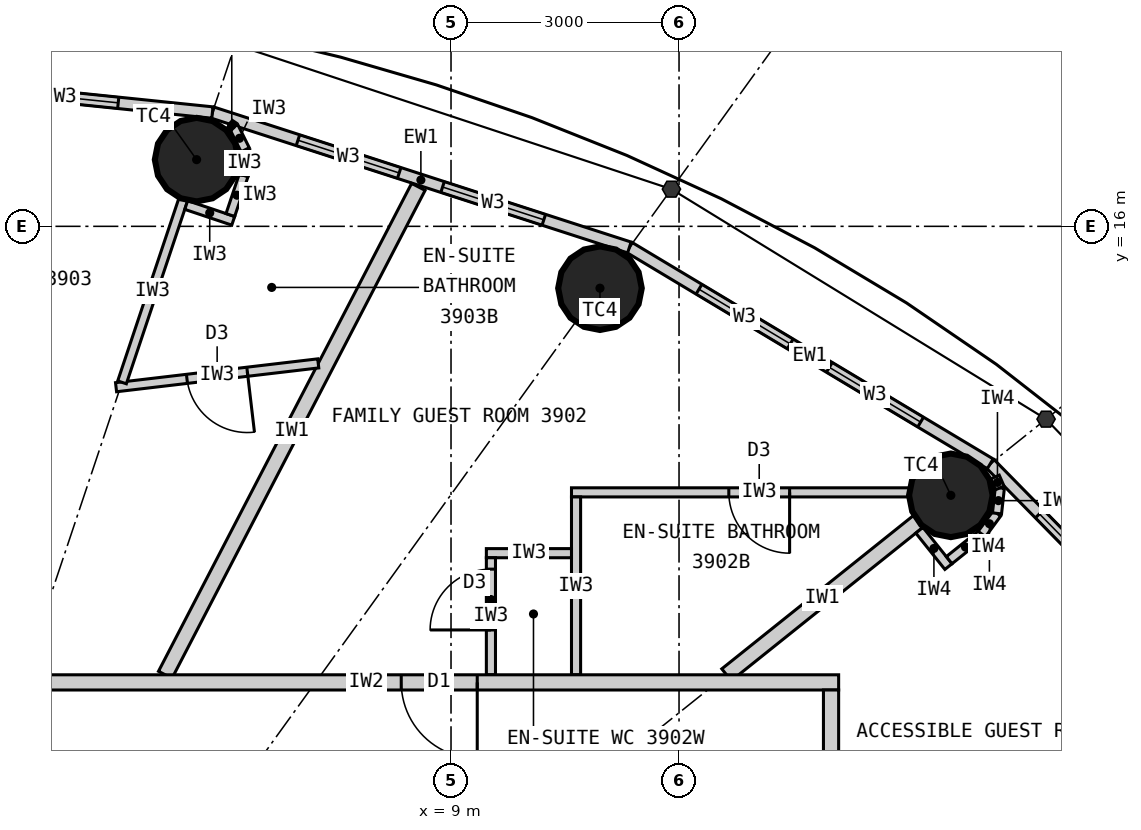
"""IFC4 building model, lengths in metres.
Left out: names, types, materials, properties, quantities, classifications, styles, units other than length and angle.
Written with IfcOpenShell. Run it as: python <this file> out.ifc"""

import sys

from ifc_helpers import new_model, si_unit, direction, frame, frame_2d, origin, origin_2d, place, context, subcontext, project, spatial, rectangle, circle, extrude, element, fill, save


model = new_model("IFC4")
c1 = context("Model", 3, precision=1e-05, world=origin(), true_north=direction((0.0, 1.0)))
c2 = subcontext(c1, "Body", "Model", "MODEL_VIEW")
j1 = project(units=[si_unit("LENGTHUNIT", "METRE"), si_unit("PLANEANGLEUNIT", "RADIAN")], contexts=[c1])
p1 = place(None, origin())
s1 = spatial("IfcSite", under=j1, at=p1, CompositionType="ELEMENT")
p2 = place(p1, origin())
s2 = spatial("IfcBuilding", under=s1, at=p2, CompositionType="ELEMENT")
p3 = place(p2, frame((0.0, 0.0, 150.0)))
s3 = spatial("IfcBuildingStorey", under=s2, at=p3, CompositionType="ELEMENT", Elevation=150.0)
for number, where, z_axis, x_axis in (
    (1, (15.576, 12.461, 0.0), (0.0, 0.0, 1.0), (1.0, 0.0, 0.0)),
    (2, (10.96, 15.186, 0.0), (0.0, 0.0, 1.0), (1.0, 0.0, 0.0)),
    (3, (5.653, 16.877, 0.0), (0.0, 0.0, 1.0), (1.0, 0.0, 0.0)),
):
    element("IfcColumn", number, at=place(p3, frame(where, z_axis=z_axis, x_axis=x_axis)), inside=s3, PredefinedType="COLUMN", context=c2, shape_type="SweptSolid", body=[
        extrude(circle(Radius=0.55, at=origin_2d()), origin(), (0.0, 0.0, 1.0), 3.3),
    ])
p4 = place(p3, frame((19.772, 9.132, 0.0), z_axis=(0.0, 0.0, 1.0), x_axis=(-0.700727467776, 0.71342905457, 0.0)))
e4 = element("IfcWall", 4, at=p4, inside=s3, PredefinedType="ELEMENTEDWALL", context=c2, shape_type="SweptSolid", body=[
    extrude(rectangle(XDim=5.247, YDim=0.15, at=frame_2d((2.624, 0.0))), origin(), (0.0, 0.0, 1.0), 3.12),
])
p5 = place(p4, frame((0.924, 0.0, 0.9)))
e5 = element("IfcOpeningElement", 5, at=p5, cuts=e4, PredefinedType="OPENING", context=c2, shape_type="SweptSolid", body=[
    extrude(rectangle(XDim=1.4, YDim=1.9, at=frame_2d((0.7, 0.95))), frame((0.0, 0.085, 0.0), z_axis=(0.0, -1.0, 0.0), x_axis=(1.0, 0.0, 0.0)), (0.0, 0.0, 1.0), 0.17),
])
p6 = place(p4, frame((2.924, 0.0, 0.9)))
e6 = element("IfcOpeningElement", 6, at=p6, cuts=e4, PredefinedType="OPENING", context=c2, shape_type="SweptSolid", body=[
    extrude(rectangle(XDim=1.4, YDim=1.9, at=frame_2d((0.7, 0.95))), frame((0.0, 0.085, 0.0), z_axis=(0.0, -1.0, 0.0), x_axis=(1.0, 0.0, 0.0)), (0.0, 0.0, 1.0), 0.17),
])
p7 = place(p3, frame((16.095, 12.876, 0.0), z_axis=(0.0, 0.0, 1.0), x_axis=(-0.857695199231, 0.514158482587, 0.0)))
e7 = element("IfcWall", 7, at=p7, inside=s3, PredefinedType="ELEMENTEDWALL", context=c2, shape_type="SweptSolid", body=[
    extrude(rectangle(XDim=5.536, YDim=0.15, at=frame_2d((2.768, 0.0))), origin(), (0.0, 0.0, 1.0), 3.12),
])
p8 = place(p7, frame((1.068, 0.0, 0.9)))
e8 = element("IfcOpeningElement", 8, at=p8, cuts=e7, PredefinedType="OPENING", context=c2, shape_type="SweptSolid", body=[
    extrude(rectangle(XDim=1.4, YDim=1.9, at=frame_2d((0.7, 0.95))), frame((0.0, 0.085, 0.0), z_axis=(0.0, -1.0, 0.0), x_axis=(1.0, 0.0, 0.0)), (0.0, 0.0, 1.0), 0.17),
])
p9 = place(p7, frame((3.068, 0.0, 0.9)))
e9 = element("IfcOpeningElement", 9, at=p9, cuts=e7, PredefinedType="OPENING", context=c2, shape_type="SweptSolid", body=[
    extrude(rectangle(XDim=1.4, YDim=1.9, at=frame_2d((0.7, 0.95))), frame((0.0, 0.085, 0.0), z_axis=(0.0, -1.0, 0.0), x_axis=(1.0, 0.0, 0.0)), (0.0, 0.0, 1.0), 0.17),
])
p10 = place(p3, frame((11.346, 15.722, 0.0), z_axis=(0.0, 0.0, 1.0), x_axis=(-0.951432482129, 0.307857486429, 0.0)))
e10 = element("IfcWall", 10, at=p10, inside=s3, PredefinedType="ELEMENTEDWALL", context=c2, shape_type="SweptSolid", body=[
    extrude(rectangle(XDim=5.766, YDim=0.15, at=frame_2d((2.883, 0.0))), origin(), (0.0, 0.0, 1.0), 3.12),
])
p11 = place(p10, frame((1.183, 0.0, 0.9)))
e11 = element("IfcOpeningElement", 11, at=p11, cuts=e10, PredefinedType="OPENING", context=c2, shape_type="SweptSolid", body=[
    extrude(rectangle(XDim=1.4, YDim=1.9, at=frame_2d((0.7, 0.95))), frame((0.0, 0.085, 0.0), z_axis=(0.0, -1.0, 0.0), x_axis=(1.0, 0.0, 0.0)), (0.0, 0.0, 1.0), 0.17),
])
p12 = place(p10, frame((3.183, 0.0, 0.9)))
e12 = element("IfcOpeningElement", 12, at=p12, cuts=e10, PredefinedType="OPENING", context=c2, shape_type="SweptSolid", body=[
    extrude(rectangle(XDim=1.4, YDim=1.9, at=frame_2d((0.7, 0.95))), frame((0.0, 0.085, 0.0), z_axis=(0.0, -1.0, 0.0), x_axis=(1.0, 0.0, 0.0)), (0.0, 0.0, 1.0), 0.17),
])
p13 = place(p3, frame((5.86, 17.497, 0.0), z_axis=(0.0, 0.0, 1.0), x_axis=(-0.994751738032, 0.102318032045, 0.0)))
e13 = element("IfcWall", 13, at=p13, inside=s3, PredefinedType="ELEMENTEDWALL", context=c2, shape_type="SweptSolid", body=[
    extrude(rectangle(XDim=5.891, YDim=0.15, at=frame_2d((2.946, 0.0))), origin(), (0.0, 0.0, 1.0), 3.12),
])
p14 = place(p13, frame((1.246, 0.0, 0.9)))
e14 = element("IfcOpeningElement", 14, at=p14, cuts=e13, PredefinedType="OPENING", context=c2, shape_type="SweptSolid", body=[
    extrude(rectangle(XDim=1.4, YDim=1.9, at=frame_2d((0.7, 0.95))), frame((0.0, 0.085, 0.0), z_axis=(0.0, -1.0, 0.0), x_axis=(1.0, 0.0, 0.0)), (0.0, 0.0, 1.0), 0.17),
])
p15 = place(p13, frame((3.246, 0.0, 0.9)))
e15 = element("IfcOpeningElement", 15, at=p15, cuts=e13, PredefinedType="OPENING", context=c2, shape_type="SweptSolid", body=[
    extrude(rectangle(XDim=1.4, YDim=1.9, at=frame_2d((0.7, 0.95))), frame((0.0, 0.085, 0.0), z_axis=(0.0, -1.0, 0.0), x_axis=(1.0, 0.0, 0.0)), (0.0, 0.0, 1.0), 0.17),
])
p16 = place(p3, frame((12.625, 10.1, 0.0), z_axis=(0.0, 0.0, 1.0), x_axis=(0.780876185034, 0.624685827954, 0.0)))
e16 = element("IfcWall", 16, at=p16, inside=s3, PredefinedType="PARTITIONING", context=c2, shape_type="SweptSolid", body=[
    extrude(rectangle(XDim=3.229, YDim=0.2, at=frame_2d((1.615, 0.0))), origin(), (0.0, 0.0, 1.0), 2.42),
])
p17 = place(p3, frame((5.24, 10.1, 0.0), z_axis=(0.0, 0.0, 1.0), x_axis=(0.460532965373, 0.887642601391, 0.0)))
e17 = element("IfcWall", 17, at=p17, inside=s3, PredefinedType="PARTITIONING", context=c2, shape_type="SweptSolid", body=[
    extrude(rectangle(XDim=7.231, YDim=0.2, at=frame_2d((3.616, 0.0))), origin(), (0.0, 0.0, 1.0), 3.12),
])
p18 = place(p3, frame((15.525, 12.5, 0.0), z_axis=(0.0, 0.0, 1.0), x_axis=(-1.0, 0.0, 0.0)))
e18 = element("IfcWall", 18, at=p18, inside=s3, PredefinedType="PARTITIONING", context=c2, shape_type="SweptSolid", body=[
    extrude(rectangle(XDim=4.94, YDim=0.12, at=frame_2d((2.47, 0.0))), origin(), (0.0, 0.0, 1.0), 3.12),
])
p19 = place(p18, frame((2.07, 0.0, 0.0)))
e19 = element("IfcOpeningElement", 19, at=p19, cuts=e18, PredefinedType="OPENING", context=c2, shape_type="SweptSolid", body=[
    extrude(rectangle(XDim=0.8, YDim=2.1, at=frame_2d((0.4, 1.05))), frame((0.0, 0.07, 0.0), z_axis=(0.0, -1.0, 0.0), x_axis=(1.0, 0.0, 0.0)), (0.0, 0.0, 1.0), 0.14),
])
p20 = place(p3, frame((10.645, 10.1, 0.0), z_axis=(0.0, 0.0, 1.0), x_axis=(0.0, 1.0, 0.0)))
e20 = element("IfcWall", 20, at=p20, inside=s3, PredefinedType="PARTITIONING", context=c2, shape_type="SweptSolid", body=[
    extrude(rectangle(XDim=2.34, YDim=0.12, at=frame_2d((1.17, 0.0))), origin(), (0.0, 0.0, 1.0), 3.12),
])
p21 = place(p3, frame((10.585, 11.7, 0.0), z_axis=(0.0, 0.0, 1.0), x_axis=(-1.0, 0.0, 0.0)))
e21 = element("IfcWall", 21, at=p21, inside=s3, PredefinedType="PARTITIONING", context=c2, shape_type="SweptSolid", body=[
    extrude(rectangle(XDim=1.12, YDim=0.12, at=frame_2d((0.56, 0.0))), origin(), (0.0, 0.0, 1.0), 3.12),
])
p22 = place(p3, frame((9.525, 10.1, 0.0), z_axis=(0.0, 0.0, 1.0), x_axis=(0.0, 1.0, 0.0)))
e22 = element("IfcWall", 22, at=p22, inside=s3, PredefinedType="PARTITIONING", context=c2, shape_type="SweptSolid", body=[
    extrude(rectangle(XDim=1.54, YDim=0.12, at=frame_2d((0.77, 0.0))), origin(), (0.0, 0.0, 1.0), 3.12),
])
p23 = place(p22, frame((0.59, 0.0, 0.0)))
e23 = element("IfcOpeningElement", 23, at=p23, cuts=e22, PredefinedType="OPENING", context=c2, shape_type="SweptSolid", body=[
    extrude(rectangle(XDim=0.8, YDim=2.1, at=frame_2d((0.4, 1.05))), frame((0.0, 0.07, 0.0), z_axis=(0.0, -1.0, 0.0), x_axis=(1.0, 0.0, 0.0)), (0.0, 0.0, 1.0), 0.14),
])
p24 = place(p3, frame((7.253, 14.197, 0.0), z_axis=(0.0, 0.0, 1.0), x_axis=(-0.993128188393, -0.117031625725, 0.0)))
e24 = element("IfcWall", 24, at=p24, inside=s3, PredefinedType="PARTITIONING", context=c2, shape_type="SweptSolid", body=[
    extrude(rectangle(XDim=2.678, YDim=0.12, at=frame_2d((1.339, 0.0))), origin(), (0.0, 0.0, 1.0), 3.12),
])
p25 = place(p24, frame((0.939, 0.0, 0.0)))
e25 = element("IfcOpeningElement", 25, at=p25, cuts=e24, PredefinedType="OPENING", context=c2, shape_type="SweptSolid", body=[
    extrude(rectangle(XDim=0.8, YDim=2.1, at=frame_2d((0.4, 1.05))), frame((0.0, 0.07, 0.0), z_axis=(0.0, -1.0, 0.0), x_axis=(1.0, 0.0, 0.0)), (0.0, 0.0, 1.0), 0.14),
])
p26 = place(p3, frame((4.671, 13.948, 0.0), z_axis=(0.0, 0.0, 1.0), x_axis=(0.317669167093, 0.948201613729, 0.0)))
e26 = element("IfcWall", 26, at=p26, inside=s3, PredefinedType="PARTITIONING", context=c2, shape_type="SweptSolid", body=[
    extrude(rectangle(XDim=2.54, YDim=0.12, at=frame_2d((1.27, 0.0))), origin(), (0.0, 0.0, 1.0), 2.42),
])
p27 = place(p3, frame((5.516, 16.28, 0.0), z_axis=(0.0, 0.0, 1.0), x_axis=(0.948157944392, -0.317799484717, 0.0)))
e27 = element("IfcWall", 27, at=p27, inside=s3, PredefinedType="PARTITIONING", context=c2, shape_type="SweptSolid", body=[
    extrude(rectangle(XDim=0.652, YDim=0.12, at=frame_2d((0.326, 0.0))), origin(), (0.0, 0.0, 1.0), 3.12),
])
p28 = place(p3, frame((6.097, 16.149, 0.0), z_axis=(0.0, 0.0, 1.0), x_axis=(0.317292604854, 0.948327687514, 0.0)))
e28 = element("IfcWall", 28, at=p28, inside=s3, PredefinedType="PARTITIONING", context=c2, shape_type="SweptSolid", body=[
    extrude(rectangle(XDim=0.55, YDim=0.12, at=frame_2d((0.275, 0.0))), origin(), (0.0, 0.0, 1.0), 3.12),
])
for number, where, z_axis, x_axis in (
    (29, (6.271, 16.67, 0.0), (0.0, 0.0, 1.0), (0.061, 0.998, 0.0)),
    (30, (6.292, 17.007, 0.0), (0.0, 0.0, 1.0), (-0.445, 0.895, 0.0)),
):
    element("IfcWall", number, at=place(p3, frame(where, z_axis=z_axis, x_axis=x_axis)), inside=s3, PredefinedType="PARTITIONING", context=c2, shape_type="SweptSolid", body=[
        extrude(rectangle(XDim=0.338, YDim=0.12, at=frame_2d((0.169, 0.0))), origin(), (0.0, 0.0, 1.0), 3.12),
    ])
p29 = place(p3, frame((6.142, 17.31, 0.0), z_axis=(0.0, 0.0, 1.0), x_axis=(-0.835039693181, 0.550189704386, 0.0)))
e31 = element("IfcWall", 31, at=p29, inside=s3, PredefinedType="PARTITIONING", context=c2, shape_type="SweptSolid", body=[
    extrude(rectangle(XDim=0.062, YDim=0.12, at=frame_2d((0.031, 0.0))), origin(), (0.0, 0.0, 1.0), 3.12),
])
p30 = place(p3, frame((1.67, 10.0, 0.0), z_axis=(0.0, 0.0, 1.0), x_axis=(1.0, 0.0, 0.0)))
e32 = element("IfcWall", 32, at=p30, inside=s3, PredefinedType="PARTITIONING", context=c2, shape_type="SweptSolid", body=[
    extrude(rectangle(XDim=12.43, YDim=0.2, at=frame_2d((6.215, 0.0))), origin(), (0.0, 0.0, 1.0), 3.12),
])
p31 = place(p30, frame((6.675, 0.0, 0.0)))
e33 = element("IfcOpeningElement", 33, at=p31, cuts=e32, PredefinedType="OPENING", context=c2, shape_type="SweptSolid", body=[
    extrude(rectangle(XDim=1.0, YDim=2.2, at=frame_2d((0.5, 1.1))), frame((0.0, 0.11, 0.0), z_axis=(0.0, -1.0, 0.0), x_axis=(1.0, 0.0, 0.0)), (0.0, 0.0, 1.0), 0.22),
])
p32 = place(p3, frame((14.0, 1.67, 0.0), z_axis=(0.0, 0.0, 1.0), x_axis=(0.0, 1.0, 0.0)))
e34 = element("IfcWall", 34, at=p32, inside=s3, PredefinedType="PARTITIONING", context=c2, shape_type="SweptSolid", body=[
    extrude(rectangle(XDim=8.23, YDim=0.2, at=frame_2d((4.115, 0.0))), origin(), (0.0, 0.0, 1.0), 3.12),
])
p33 = place(p32, frame((5.552, 0.0, 0.0)))
e35 = element("IfcOpeningElement", 35, at=p33, cuts=e34, PredefinedType="OPENING", context=c2, shape_type="SweptSolid", body=[
    extrude(rectangle(XDim=1.0, YDim=2.2, at=frame_2d((0.5, 1.1))), frame((0.0, 0.11, 0.0), z_axis=(0.0, -1.0, 0.0), x_axis=(1.0, 0.0, 0.0)), (0.0, 0.0, 1.0), 0.22),
])
p34 = place(p3, frame((15.162, 12.002, 0.0), z_axis=(0.0, 0.0, 1.0), x_axis=(0.624597762427, -0.780946627607, 0.0)))
e36 = element("IfcWall", 36, at=p34, inside=s3, PredefinedType="PARTITIONING", context=c2, shape_type="SweptSolid", body=[
    extrude(rectangle(XDim=0.612, YDim=0.12, at=frame_2d((0.306, 0.0))), origin(), (0.0, 0.0, 1.0), 3.12),
])
p35 = place(p3, frame((15.554, 11.608, 0.0), z_axis=(0.0, 0.0, 1.0), x_axis=(0.780695577787, 0.624911525597, 0.0)))
e37 = element("IfcWall", 37, at=p35, inside=s3, PredefinedType="PARTITIONING", context=c2, shape_type="SweptSolid", body=[
    extrude(rectangle(XDim=0.55, YDim=0.12, at=frame_2d((0.275, 0.0))), origin(), (0.0, 0.0, 1.0), 3.12),
])
p36 = place(p3, frame((15.984, 11.952, 0.0), z_axis=(0.0, 0.0, 1.0), x_axis=(0.592335221171, 0.805691619517, 0.0)))
e38 = element("IfcWall", 38, at=p36, inside=s3, PredefinedType="PARTITIONING", context=c2, shape_type="SweptSolid", body=[
    extrude(rectangle(XDim=0.338, YDim=0.12, at=frame_2d((0.169, 0.0))), origin(), (0.0, 0.0, 1.0), 3.12),
])
p37 = place(p3, frame((16.184, 12.224, 0.0), z_axis=(0.0, 0.0, 1.0), x_axis=(0.110669692975, 0.993857242795, 0.0)))
e39 = element("IfcWall", 39, at=p37, inside=s3, PredefinedType="PARTITIONING", context=c2, shape_type="SweptSolid", body=[
    extrude(rectangle(XDim=0.337, YDim=0.12, at=frame_2d((0.169, 0.0))), origin(), (0.0, 0.0, 1.0), 3.12),
])
p38 = place(p3, frame((16.221, 12.559, 0.0), z_axis=(0.0, 0.0, 1.0), x_axis=(-0.401064416249, 0.916049853457, 0.0)))
e40 = element("IfcWall", 40, at=p38, inside=s3, PredefinedType="PARTITIONING", context=c2, shape_type="SweptSolid", body=[
    extrude(rectangle(XDim=0.156, YDim=0.12, at=frame_2d((0.078, 0.0))), origin(), (0.0, 0.0, 1.0), 3.12),
])
p39 = place(p6, origin())
e41 = element("IfcWindow", 41, at=p39, inside=s3, PartitioningType="SINGLE_PANEL", PredefinedType="WINDOW", context=c2, shape_type="SweptSolid", body=[
    extrude(rectangle(XDim=1.4, YDim=1.9, at=frame_2d((0.7, 0.95))), frame((0.0, 0.03, 0.0), z_axis=(0.0, -1.0, 0.0), x_axis=(1.0, 0.0, 0.0)), (0.0, 0.0, 1.0), 0.06),
])
fill(e6, e41)
p40 = place(p8, origin())
e42 = element("IfcWindow", 42, at=p40, inside=s3, PartitioningType="SINGLE_PANEL", PredefinedType="WINDOW", context=c2, shape_type="SweptSolid", body=[
    extrude(rectangle(XDim=1.4, YDim=1.9, at=frame_2d((0.7, 0.95))), frame((0.0, 0.03, 0.0), z_axis=(0.0, -1.0, 0.0), x_axis=(1.0, 0.0, 0.0)), (0.0, 0.0, 1.0), 0.06),
])
fill(e8, e42)
p41 = place(p9, origin())
e43 = element("IfcWindow", 43, at=p41, inside=s3, PartitioningType="SINGLE_PANEL", PredefinedType="WINDOW", context=c2, shape_type="SweptSolid", body=[
    extrude(rectangle(XDim=1.4, YDim=1.9, at=frame_2d((0.7, 0.95))), frame((0.0, 0.03, 0.0), z_axis=(0.0, -1.0, 0.0), x_axis=(1.0, 0.0, 0.0)), (0.0, 0.0, 1.0), 0.06),
])
fill(e9, e43)
p42 = place(p11, origin())
e44 = element("IfcWindow", 44, at=p42, inside=s3, PartitioningType="SINGLE_PANEL", PredefinedType="WINDOW", context=c2, shape_type="SweptSolid", body=[
    extrude(rectangle(XDim=1.4, YDim=1.9, at=frame_2d((0.7, 0.95))), frame((0.0, 0.03, 0.0), z_axis=(0.0, -1.0, 0.0), x_axis=(1.0, 0.0, 0.0)), (0.0, 0.0, 1.0), 0.06),
])
fill(e11, e44)
p43 = place(p12, origin())
e45 = element("IfcWindow", 45, at=p43, inside=s3, PartitioningType="SINGLE_PANEL", PredefinedType="WINDOW", context=c2, shape_type="SweptSolid", body=[
    extrude(rectangle(XDim=1.4, YDim=1.9, at=frame_2d((0.7, 0.95))), frame((0.0, 0.03, 0.0), z_axis=(0.0, -1.0, 0.0), x_axis=(1.0, 0.0, 0.0)), (0.0, 0.0, 1.0), 0.06),
])
fill(e12, e45)
p44 = place(p14, origin())
e46 = element("IfcWindow", 46, at=p44, inside=s3, PartitioningType="SINGLE_PANEL", PredefinedType="WINDOW", context=c2, shape_type="SweptSolid", body=[
    extrude(rectangle(XDim=1.4, YDim=1.9, at=frame_2d((0.7, 0.95))), frame((0.0, 0.03, 0.0), z_axis=(0.0, -1.0, 0.0), x_axis=(1.0, 0.0, 0.0)), (0.0, 0.0, 1.0), 0.06),
])
fill(e14, e46)
p45 = place(p19, origin())
e47 = element("IfcDoor", 47, at=p45, inside=s3, OperationType="SINGLE_SWING_LEFT", PredefinedType="DOOR", context=c2, shape_type="SweptSolid", body=[
    extrude(rectangle(XDim=0.8, YDim=2.1, at=frame_2d((0.4, 1.05))), frame((0.0, 0.025, 0.0), z_axis=(0.0, -1.0, 0.0), x_axis=(1.0, 0.0, 0.0)), (0.0, 0.0, 1.0), 0.05),
])
fill(e19, e47)
p46 = place(p23, origin())
e48 = element("IfcDoor", 48, at=p46, inside=s3, OperationType="SINGLE_SWING_LEFT", PredefinedType="DOOR", context=c2, shape_type="SweptSolid", body=[
    extrude(rectangle(XDim=0.8, YDim=2.1, at=frame_2d((0.4, 1.05))), frame((0.0, 0.025, 0.0), z_axis=(0.0, -1.0, 0.0), x_axis=(1.0, 0.0, 0.0)), (0.0, 0.0, 1.0), 0.05),
])
fill(e23, e48)
p47 = place(p31, origin())
e49 = element("IfcDoor", 49, at=p47, inside=s3, OperationType="SINGLE_SWING_RIGHT", PredefinedType="DOOR", context=c2, shape_type="SweptSolid", body=[
    extrude(rectangle(XDim=1.0, YDim=2.2, at=frame_2d((0.5, 1.1))), frame((0.0, 0.025, 0.0), z_axis=(0.0, -1.0, 0.0), x_axis=(1.0, 0.0, 0.0)), (0.0, 0.0, 1.0), 0.05),
])
fill(e33, e49)
p48 = place(p25, origin())
e50 = element("IfcDoor", 50, at=p48, inside=s3, OperationType="SINGLE_SWING_LEFT", PredefinedType="DOOR", context=c2, shape_type="SweptSolid", body=[
    extrude(rectangle(XDim=0.8, YDim=2.1, at=frame_2d((0.4, 1.05))), frame((0.0, 0.025, 0.0), z_axis=(0.0, -1.0, 0.0), x_axis=(1.0, 0.0, 0.0)), (0.0, 0.0, 1.0), 0.05),
])
fill(e25, e50)
save(model, sys.argv[1])
